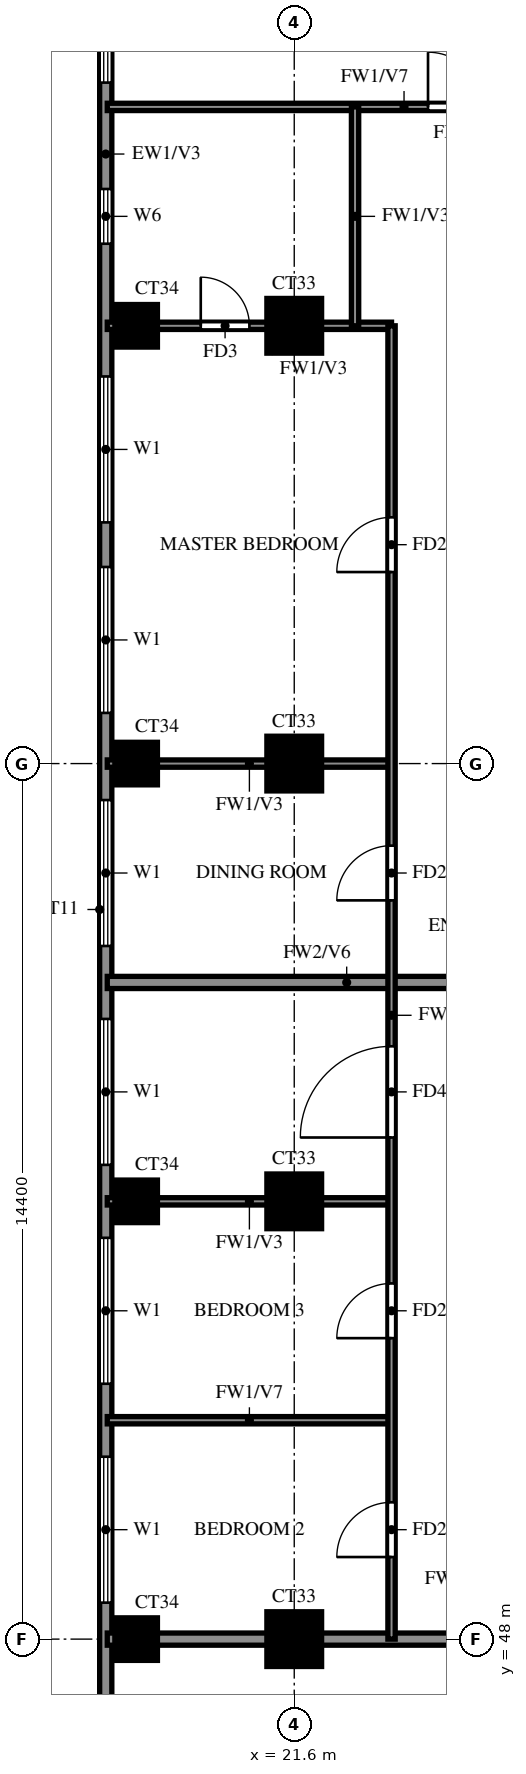
"""IFC4 building model, lengths in metres.
Left out: names, types, materials, properties, quantities, classifications, styles, units other than length and angle.
Written with IfcOpenShell. Run it as: python <this file> out.ifc"""

import sys

from ifc_helpers import new_model, si_unit, direction, frame, frame_2d, origin, origin_2d, place, context, subcontext, project, spatial, rectangle, extrude, source, transform, mapped, element, fill, save


model = new_model("IFC4")
c1 = context("Model", 3, precision=1e-05, world=origin(), true_north=direction((0.0, 1.0)))
c2 = subcontext(c1, "Body", "Model", "MODEL_VIEW")
j1 = project(units=[si_unit("LENGTHUNIT", "METRE"), si_unit("PLANEANGLEUNIT", "RADIAN")], contexts=[c1])
p1 = place(None, origin())
s1 = spatial("IfcSite", under=j1, at=p1, CompositionType="ELEMENT")
p2 = place(p1, origin())
s2 = spatial("IfcBuilding", under=s1, at=p2, CompositionType="ELEMENT")
p3 = place(p2, frame((0.0, 0.0, 215.0)))
s3 = spatial("IfcBuildingStorey", under=s2, at=p3, CompositionType="ELEMENT", Elevation=215.0)
m1 = source(origin(), c2, "Body", "SweptSolid", [
    extrude(rectangle(XDim=0.7, YDim=0.7, at=origin_2d()), origin(), (0.0, 0.0, 1.0), 3.22),
])
p4 = place(p3, frame((19.0, 48.0, 0.0), z_axis=(0.0, 0.0, 1.0), x_axis=(1.0, 0.0, 0.0)))
e1 = element("IfcColumn", 1, at=p4, inside=s3, PredefinedType="COLUMN", context=c2, shape_type="MappedRepresentation", body=[
    mapped(m1, transform((0.0, 0.0, 0.0))),
])
m2 = source(origin(), c2, "Body", "SweptSolid", [
    extrude(rectangle(XDim=0.9, YDim=0.9, at=origin_2d()), origin(), (0.0, 0.0, 1.0), 3.22),
])
p5 = place(p3, frame((21.6, 48.0, 0.0), z_axis=(0.0, 0.0, 1.0), x_axis=(1.0, 0.0, 0.0)))
e2 = element("IfcColumn", 2, at=p5, inside=s3, PredefinedType="COLUMN", context=c2, shape_type="MappedRepresentation", body=[
    mapped(m2, transform((0.0, 0.0, 0.0))),
])
p6 = place(p3, frame((19.0, 55.2, 0.0), z_axis=(0.0, 0.0, 1.0), x_axis=(1.0, 0.0, 0.0)))
e3 = element("IfcColumn", 3, at=p6, inside=s3, PredefinedType="COLUMN", context=c2, shape_type="MappedRepresentation", body=[
    mapped(m1, transform((0.0, 0.0, 0.0))),
])
p7 = place(p3, frame((21.6, 55.2, 0.0), z_axis=(0.0, 0.0, 1.0), x_axis=(1.0, 0.0, 0.0)))
e4 = element("IfcColumn", 4, at=p7, inside=s3, PredefinedType="COLUMN", context=c2, shape_type="MappedRepresentation", body=[
    mapped(m2, transform((0.0, 0.0, 0.0))),
])
p8 = place(p3, frame((19.0, 62.4, 0.0), z_axis=(0.0, 0.0, 1.0), x_axis=(1.0, 0.0, 0.0)))
e5 = element("IfcColumn", 5, at=p8, inside=s3, PredefinedType="COLUMN", context=c2, shape_type="MappedRepresentation", body=[
    mapped(m1, transform((0.0, 0.0, 0.0))),
])
p9 = place(p3, frame((21.6, 62.4, 0.0), z_axis=(0.0, 0.0, 1.0), x_axis=(1.0, 0.0, 0.0)))
e6 = element("IfcColumn", 6, at=p9, inside=s3, PredefinedType="COLUMN", context=c2, shape_type="MappedRepresentation", body=[
    mapped(m2, transform((0.0, 0.0, 0.0))),
])
p10 = place(p3, frame((19.0, 69.6, 0.0), z_axis=(0.0, 0.0, 1.0), x_axis=(1.0, 0.0, 0.0)))
e7 = element("IfcColumn", 7, at=p10, inside=s3, PredefinedType="COLUMN", context=c2, shape_type="MappedRepresentation", body=[
    mapped(m1, transform((0.0, 0.0, 0.0))),
])
p11 = place(p3, frame((21.6, 69.6, 0.0), z_axis=(0.0, 0.0, 1.0), x_axis=(1.0, 0.0, 0.0)))
e8 = element("IfcColumn", 8, at=p11, inside=s3, PredefinedType="COLUMN", context=c2, shape_type="MappedRepresentation", body=[
    mapped(m2, transform((0.0, 0.0, 0.0))),
])
p12 = place(p3, frame((18.5, 76.6, 0.0), z_axis=(0.0, 0.0, 1.0), x_axis=(0.0, -1.0, 0.0)))
e9 = element("IfcWall", 9, at=p12, inside=s3, PredefinedType="SOLIDWALL", context=c2, shape_type="SweptSolid", body=[
    extrude(rectangle(XDim=33.4, YDim=0.2, at=frame_2d((16.7, 0.0))), origin(), (0.0, 0.0, 1.0), 3.22),
])
p13 = place(p12, frame((29.7, 0.0, 0.6)))
e10 = element("IfcOpeningElement", 10, at=p13, cuts=e9, PredefinedType="OPENING", context=c2, shape_type="SweptSolid", body=[
    extrude(rectangle(XDim=2.4, YDim=2.4, at=frame_2d((1.2, 1.2))), frame((0.0, 0.11, 0.0), z_axis=(0.0, -1.0, 0.0), x_axis=(1.0, 0.0, 0.0)), (0.0, 0.0, 1.0), 0.22),
])
p14 = place(p12, frame((25.6, 0.0, 0.6)))
e11 = element("IfcOpeningElement", 11, at=p14, cuts=e9, PredefinedType="OPENING", context=c2, shape_type="SweptSolid", body=[
    extrude(rectangle(XDim=2.4, YDim=2.4, at=frame_2d((1.2, 1.2))), frame((0.0, 0.11, 0.0), z_axis=(0.0, -1.0, 0.0), x_axis=(1.0, 0.0, 0.0)), (0.0, 0.0, 1.0), 0.22),
])
p15 = place(p12, frame((22.0, 0.0, 0.6)))
e12 = element("IfcOpeningElement", 12, at=p15, cuts=e9, PredefinedType="OPENING", context=c2, shape_type="SweptSolid", body=[
    extrude(rectangle(XDim=2.4, YDim=2.4, at=frame_2d((1.2, 1.2))), frame((0.0, 0.11, 0.0), z_axis=(0.0, -1.0, 0.0), x_axis=(1.0, 0.0, 0.0)), (0.0, 0.0, 1.0), 0.22),
])
p16 = place(p12, frame((18.4, 0.0, 0.6)))
e13 = element("IfcOpeningElement", 13, at=p16, cuts=e9, PredefinedType="OPENING", context=c2, shape_type="SweptSolid", body=[
    extrude(rectangle(XDim=2.4, YDim=2.4, at=frame_2d((1.2, 1.2))), frame((0.0, 0.11, 0.0), z_axis=(0.0, -1.0, 0.0), x_axis=(1.0, 0.0, 0.0)), (0.0, 0.0, 1.0), 0.22),
])
p17 = place(p12, frame((14.8, 0.0, 0.6)))
e14 = element("IfcOpeningElement", 14, at=p17, cuts=e9, PredefinedType="OPENING", context=c2, shape_type="SweptSolid", body=[
    extrude(rectangle(XDim=2.4, YDim=2.4, at=frame_2d((1.2, 1.2))), frame((0.0, 0.11, 0.0), z_axis=(0.0, -1.0, 0.0), x_axis=(1.0, 0.0, 0.0)), (0.0, 0.0, 1.0), 0.22),
])
p18 = place(p12, frame((7.833, 0.0, 0.6)))
e15 = element("IfcOpeningElement", 15, at=p18, cuts=e9, PredefinedType="OPENING", context=c2, shape_type="SweptSolid", body=[
    extrude(rectangle(XDim=2.4, YDim=2.4, at=frame_2d((1.2, 1.2))), frame((0.0, 0.11, 0.0), z_axis=(0.0, -1.0, 0.0), x_axis=(1.0, 0.0, 0.0)), (0.0, 0.0, 1.0), 0.22),
])
p19 = place(p12, frame((10.967, 0.0, 0.6)))
e16 = element("IfcOpeningElement", 16, at=p19, cuts=e9, PredefinedType="OPENING", context=c2, shape_type="SweptSolid", body=[
    extrude(rectangle(XDim=2.4, YDim=2.4, at=frame_2d((1.2, 1.2))), frame((0.0, 0.11, 0.0), z_axis=(0.0, -1.0, 0.0), x_axis=(1.0, 0.0, 0.0)), (0.0, 0.0, 1.0), 0.22),
])
p20 = place(p12, frame((4.75, 0.0, 1.5)))
e17 = element("IfcOpeningElement", 17, at=p20, cuts=e9, PredefinedType="OPENING", context=c2, shape_type="SweptSolid", body=[
    extrude(rectangle(XDim=0.9, YDim=0.9, at=frame_2d((0.45, 0.45))), frame((0.0, 0.11, 0.0), z_axis=(0.0, -1.0, 0.0), x_axis=(1.0, 0.0, 0.0)), (0.0, 0.0, 1.0), 0.22),
])
p21 = place(p12, frame((0.6, 0.0, 0.6)))
e18 = element("IfcOpeningElement", 18, at=p21, cuts=e9, PredefinedType="OPENING", context=c2, shape_type="SweptSolid", body=[
    extrude(rectangle(XDim=2.4, YDim=2.4, at=frame_2d((1.2, 1.2))), frame((0.0, 0.11, 0.0), z_axis=(0.0, -1.0, 0.0), x_axis=(1.0, 0.0, 0.0)), (0.0, 0.0, 1.0), 0.22),
])
p22 = place(p3, frame((18.525, 48.0, 0.0), z_axis=(0.0, 0.0, 1.0), x_axis=(1.0, 0.0, 0.0)))
e19 = element("IfcWall", 19, at=p22, inside=s3, PredefinedType="SOLIDWALL", context=c2, shape_type="SweptSolid", body=[
    extrude(rectangle(XDim=15.075, YDim=0.2, at=frame_2d((7.538, 0.0))), origin(), (0.0, 0.0, 1.0), 3.22),
])
p23 = place(p3, frame((18.525, 58.8, 0.0), z_axis=(0.0, 0.0, 1.0), x_axis=(1.0, 0.0, 0.0)))
e20 = element("IfcWall", 20, at=p23, inside=s3, PredefinedType="SOLIDWALL", context=c2, shape_type="SweptSolid", body=[
    extrude(rectangle(XDim=7.875, YDim=0.2, at=frame_2d((3.938, 0.0))), origin(), (0.0, 0.0, 1.0), 2.32),
])
p24 = place(p3, frame((18.525, 51.6, 0.0), z_axis=(0.0, 0.0, 1.0), x_axis=(1.0, 0.0, 0.0)))
e21 = element("IfcWall", 21, at=p24, inside=s3, PredefinedType="PARTITIONING", context=c2, shape_type="SweptSolid", body=[
    extrude(rectangle(XDim=4.675, YDim=0.12, at=frame_2d((2.337, 0.0))), origin(), (0.0, 0.0, 1.0), 2.32),
])
for number, where, z_axis, x_axis in (
    (22, (18.525, 55.2, 0.0), (0.0, 0.0, 1.0), (1.0, 0.0, 0.0)),
    (23, (18.525, 62.4, 0.0), (0.0, 0.0, 1.0), (1.0, 0.0, 0.0)),
):
    element("IfcWall", number, at=place(p3, frame(where, z_axis=z_axis, x_axis=x_axis)), inside=s3, PredefinedType="PARTITIONING", context=c2, shape_type="SweptSolid", body=[
        extrude(rectangle(XDim=4.675, YDim=0.12, at=frame_2d((2.337, 0.0))), origin(), (0.0, 0.0, 1.0), 3.22),
    ])
p25 = place(p3, frame((18.525, 69.6, 0.0), z_axis=(0.0, 0.0, 1.0), x_axis=(1.0, 0.0, 0.0)))
e24 = element("IfcWall", 24, at=p25, inside=s3, PredefinedType="PARTITIONING", context=c2, shape_type="SweptSolid", body=[
    extrude(rectangle(XDim=4.675, YDim=0.12, at=frame_2d((2.337, 0.0))), origin(), (0.0, 0.0, 1.0), 3.22),
])
p26 = place(p25, frame((1.538, 0.0, 0.0)))
e25 = element("IfcOpeningElement", 25, at=p26, cuts=e24, PredefinedType="OPENING", context=c2, shape_type="SweptSolid", body=[
    extrude(rectangle(XDim=0.8, YDim=2.1, at=frame_2d((0.4, 1.05))), frame((0.0, 0.07, 0.0), z_axis=(0.0, -1.0, 0.0), x_axis=(1.0, 0.0, 0.0)), (0.0, 0.0, 1.0), 0.14),
])
p27 = place(p3, frame((18.525, 73.2, 0.0), z_axis=(0.0, 0.0, 1.0), x_axis=(1.0, 0.0, 0.0)))
e26 = element("IfcWall", 26, at=p27, inside=s3, PredefinedType="PARTITIONING", context=c2, shape_type="SweptSolid", body=[
    extrude(rectangle(XDim=10.275, YDim=0.12, at=frame_2d((5.138, 0.0))), origin(), (0.0, 0.0, 1.0), 2.32),
])
p28 = place(p27, frame((5.275, 0.0, 0.0)))
e27 = element("IfcOpeningElement", 27, at=p28, cuts=e26, PredefinedType="OPENING", context=c2, shape_type="SweptSolid", body=[
    extrude(rectangle(XDim=0.9, YDim=2.1, at=frame_2d((0.45, 1.05))), frame((0.0, 0.07, 0.0), z_axis=(0.0, -1.0, 0.0), x_axis=(1.0, 0.0, 0.0)), (0.0, 0.0, 1.0), 0.14),
])
p29 = place(p3, frame((22.6, 69.6, 0.0), z_axis=(0.0, 0.0, 1.0), x_axis=(0.0, 1.0, 0.0)))
e28 = element("IfcWall", 28, at=p29, inside=s3, PredefinedType="PARTITIONING", context=c2, shape_type="SweptSolid", body=[
    extrude(rectangle(XDim=3.6, YDim=0.12, at=frame_2d((1.8, 0.0))), origin(), (0.0, 0.0, 1.0), 3.22),
])
p30 = place(p3, frame((23.2, 48.0, 0.0), z_axis=(0.0, 0.0, 1.0), x_axis=(0.0, 1.0, 0.0)))
e29 = element("IfcWall", 29, at=p30, inside=s3, PredefinedType="PARTITIONING", context=c2, shape_type="SweptSolid", body=[
    extrude(rectangle(XDim=21.6, YDim=0.12, at=frame_2d((10.8, 0.0))), origin(), (0.0, 0.0, 1.0), 3.22),
])
p31 = place(p30, frame((1.35, 0.0, 0.0)))
e30 = element("IfcOpeningElement", 30, at=p31, cuts=e29, PredefinedType="OPENING", context=c2, shape_type="SweptSolid", body=[
    extrude(rectangle(XDim=0.9, YDim=2.1, at=frame_2d((0.45, 1.05))), frame((0.0, 0.07, 0.0), z_axis=(0.0, -1.0, 0.0), x_axis=(1.0, 0.0, 0.0)), (0.0, 0.0, 1.0), 0.14),
])
p32 = place(p30, frame((4.95, 0.0, 0.0)))
e31 = element("IfcOpeningElement", 31, at=p32, cuts=e29, PredefinedType="OPENING", context=c2, shape_type="SweptSolid", body=[
    extrude(rectangle(XDim=0.9, YDim=2.1, at=frame_2d((0.45, 1.05))), frame((0.0, 0.07, 0.0), z_axis=(0.0, -1.0, 0.0), x_axis=(1.0, 0.0, 0.0)), (0.0, 0.0, 1.0), 0.14),
])
p33 = place(p30, frame((8.25, 0.0, 0.0)))
e32 = element("IfcOpeningElement", 32, at=p33, cuts=e29, PredefinedType="OPENING", context=c2, shape_type="SweptSolid", body=[
    extrude(rectangle(XDim=1.5, YDim=2.1, at=frame_2d((0.75, 1.05))), frame((0.0, 0.07, 0.0), z_axis=(0.0, -1.0, 0.0), x_axis=(1.0, 0.0, 0.0)), (0.0, 0.0, 1.0), 0.14),
])
p34 = place(p30, frame((12.15, 0.0, 0.0)))
e33 = element("IfcOpeningElement", 33, at=p34, cuts=e29, PredefinedType="OPENING", context=c2, shape_type="SweptSolid", body=[
    extrude(rectangle(XDim=0.9, YDim=2.1, at=frame_2d((0.45, 1.05))), frame((0.0, 0.07, 0.0), z_axis=(0.0, -1.0, 0.0), x_axis=(1.0, 0.0, 0.0)), (0.0, 0.0, 1.0), 0.14),
])
p35 = place(p30, frame((17.55, 0.0, 0.0)))
e34 = element("IfcOpeningElement", 34, at=p35, cuts=e29, PredefinedType="OPENING", context=c2, shape_type="SweptSolid", body=[
    extrude(rectangle(XDim=0.9, YDim=2.1, at=frame_2d((0.45, 1.05))), frame((0.0, 0.07, 0.0), z_axis=(0.0, -1.0, 0.0), x_axis=(1.0, 0.0, 0.0)), (0.0, 0.0, 1.0), 0.14),
])
p36 = place(p14, origin())
e35 = element("IfcWindow", 35, at=p36, inside=s3, PartitioningType="DOUBLE_PANEL_VERTICAL", PredefinedType="WINDOW", context=c2, shape_type="SweptSolid", body=[
    extrude(rectangle(XDim=2.4, YDim=2.4, at=frame_2d((1.2, 1.2))), frame((0.0, 0.03, 0.0), z_axis=(0.0, -1.0, 0.0), x_axis=(1.0, 0.0, 0.0)), (0.0, 0.0, 1.0), 0.06),
])
fill(e11, e35)
p37 = place(p15, origin())
e36 = element("IfcWindow", 36, at=p37, inside=s3, PartitioningType="DOUBLE_PANEL_VERTICAL", PredefinedType="WINDOW", context=c2, shape_type="SweptSolid", body=[
    extrude(rectangle(XDim=2.4, YDim=2.4, at=frame_2d((1.2, 1.2))), frame((0.0, 0.03, 0.0), z_axis=(0.0, -1.0, 0.0), x_axis=(1.0, 0.0, 0.0)), (0.0, 0.0, 1.0), 0.06),
])
fill(e12, e36)
p38 = place(p16, origin())
e37 = element("IfcWindow", 37, at=p38, inside=s3, PartitioningType="DOUBLE_PANEL_VERTICAL", PredefinedType="WINDOW", context=c2, shape_type="SweptSolid", body=[
    extrude(rectangle(XDim=2.4, YDim=2.4, at=frame_2d((1.2, 1.2))), frame((0.0, 0.03, 0.0), z_axis=(0.0, -1.0, 0.0), x_axis=(1.0, 0.0, 0.0)), (0.0, 0.0, 1.0), 0.06),
])
fill(e13, e37)
p39 = place(p17, origin())
e38 = element("IfcWindow", 38, at=p39, inside=s3, PartitioningType="DOUBLE_PANEL_VERTICAL", PredefinedType="WINDOW", context=c2, shape_type="SweptSolid", body=[
    extrude(rectangle(XDim=2.4, YDim=2.4, at=frame_2d((1.2, 1.2))), frame((0.0, 0.03, 0.0), z_axis=(0.0, -1.0, 0.0), x_axis=(1.0, 0.0, 0.0)), (0.0, 0.0, 1.0), 0.06),
])
fill(e14, e38)
p40 = place(p18, origin())
e39 = element("IfcWindow", 39, at=p40, inside=s3, PartitioningType="DOUBLE_PANEL_VERTICAL", PredefinedType="WINDOW", context=c2, shape_type="SweptSolid", body=[
    extrude(rectangle(XDim=2.4, YDim=2.4, at=frame_2d((1.2, 1.2))), frame((0.0, 0.03, 0.0), z_axis=(0.0, -1.0, 0.0), x_axis=(1.0, 0.0, 0.0)), (0.0, 0.0, 1.0), 0.06),
])
fill(e15, e39)
p41 = place(p19, origin())
e40 = element("IfcWindow", 40, at=p41, inside=s3, PartitioningType="DOUBLE_PANEL_VERTICAL", PredefinedType="WINDOW", context=c2, shape_type="SweptSolid", body=[
    extrude(rectangle(XDim=2.4, YDim=2.4, at=frame_2d((1.2, 1.2))), frame((0.0, 0.03, 0.0), z_axis=(0.0, -1.0, 0.0), x_axis=(1.0, 0.0, 0.0)), (0.0, 0.0, 1.0), 0.06),
])
fill(e16, e40)
p42 = place(p20, origin())
e41 = element("IfcWindow", 41, at=p42, inside=s3, PartitioningType="SINGLE_PANEL", PredefinedType="WINDOW", context=c2, shape_type="SweptSolid", body=[
    extrude(rectangle(XDim=0.9, YDim=0.9, at=frame_2d((0.45, 0.45))), frame((0.0, 0.03, 0.0), z_axis=(0.0, -1.0, 0.0), x_axis=(1.0, 0.0, 0.0)), (0.0, 0.0, 1.0), 0.06),
])
fill(e17, e41)
p43 = place(p21, origin())
e42 = element("IfcWindow", 42, at=p43, inside=s3, PartitioningType="DOUBLE_PANEL_VERTICAL", PredefinedType="WINDOW", context=c2, shape_type="SweptSolid", body=[
    extrude(rectangle(XDim=2.4, YDim=2.4, at=frame_2d((1.2, 1.2))), frame((0.0, 0.03, 0.0), z_axis=(0.0, -1.0, 0.0), x_axis=(1.0, 0.0, 0.0)), (0.0, 0.0, 1.0), 0.06),
])
fill(e18, e42)
p44 = place(p31, origin())
e43 = element("IfcDoor", 43, at=p44, inside=s3, OperationType="SINGLE_SWING_LEFT", PredefinedType="DOOR", context=c2, shape_type="SweptSolid", body=[
    extrude(rectangle(XDim=0.9, YDim=2.1, at=frame_2d((0.45, 1.05))), frame((0.0, 0.025, 0.0), z_axis=(0.0, -1.0, 0.0), x_axis=(1.0, 0.0, 0.0)), (0.0, 0.0, 1.0), 0.05),
])
fill(e30, e43)
p45 = place(p32, origin())
e44 = element("IfcDoor", 44, at=p45, inside=s3, OperationType="SINGLE_SWING_LEFT", PredefinedType="DOOR", context=c2, shape_type="SweptSolid", body=[
    extrude(rectangle(XDim=0.9, YDim=2.1, at=frame_2d((0.45, 1.05))), frame((0.0, 0.025, 0.0), z_axis=(0.0, -1.0, 0.0), x_axis=(1.0, 0.0, 0.0)), (0.0, 0.0, 1.0), 0.05),
])
fill(e31, e44)
p46 = place(p33, origin())
e45 = element("IfcDoor", 45, at=p46, inside=s3, OperationType="SINGLE_SWING_RIGHT", PredefinedType="DOOR", context=c2, shape_type="SweptSolid", body=[
    extrude(rectangle(XDim=1.5, YDim=2.1, at=frame_2d((0.75, 1.05))), frame((0.0, 0.025, 0.0), z_axis=(0.0, -1.0, 0.0), x_axis=(1.0, 0.0, 0.0)), (0.0, 0.0, 1.0), 0.05),
])
fill(e32, e45)
p47 = place(p34, origin())
e46 = element("IfcDoor", 46, at=p47, inside=s3, OperationType="SINGLE_SWING_RIGHT", PredefinedType="DOOR", context=c2, shape_type="SweptSolid", body=[
    extrude(rectangle(XDim=0.9, YDim=2.1, at=frame_2d((0.45, 1.05))), frame((0.0, 0.025, 0.0), z_axis=(0.0, -1.0, 0.0), x_axis=(1.0, 0.0, 0.0)), (0.0, 0.0, 1.0), 0.05),
])
fill(e33, e46)
p48 = place(p35, origin())
e47 = element("IfcDoor", 47, at=p48, inside=s3, OperationType="SINGLE_SWING_LEFT", PredefinedType="DOOR", context=c2, shape_type="SweptSolid", body=[
    extrude(rectangle(XDim=0.9, YDim=2.1, at=frame_2d((0.45, 1.05))), frame((0.0, 0.025, 0.0), z_axis=(0.0, -1.0, 0.0), x_axis=(1.0, 0.0, 0.0)), (0.0, 0.0, 1.0), 0.05),
])
fill(e34, e47)
p49 = place(p26, origin())
e48 = element("IfcDoor", 48, at=p49, inside=s3, OperationType="SINGLE_SWING_RIGHT", PredefinedType="DOOR", context=c2, shape_type="SweptSolid", body=[
    extrude(rectangle(XDim=0.8, YDim=2.1, at=frame_2d((0.4, 1.05))), frame((0.0, 0.025, 0.0), z_axis=(0.0, -1.0, 0.0), x_axis=(1.0, 0.0, 0.0)), (0.0, 0.0, 1.0), 0.05),
])
fill(e25, e48)
p50 = place(p28, origin())
e49 = element("IfcDoor", 49, at=p50, inside=s3, OperationType="SINGLE_SWING_RIGHT", PredefinedType="DOOR", context=c2, shape_type="SweptSolid", body=[
    extrude(rectangle(XDim=0.9, YDim=2.1, at=frame_2d((0.45, 1.05))), frame((0.0, 0.025, 0.0), z_axis=(0.0, -1.0, 0.0), x_axis=(1.0, 0.0, 0.0)), (0.0, 0.0, 1.0), 0.05),
])
fill(e27, e49)
save(model, sys.argv[1])
